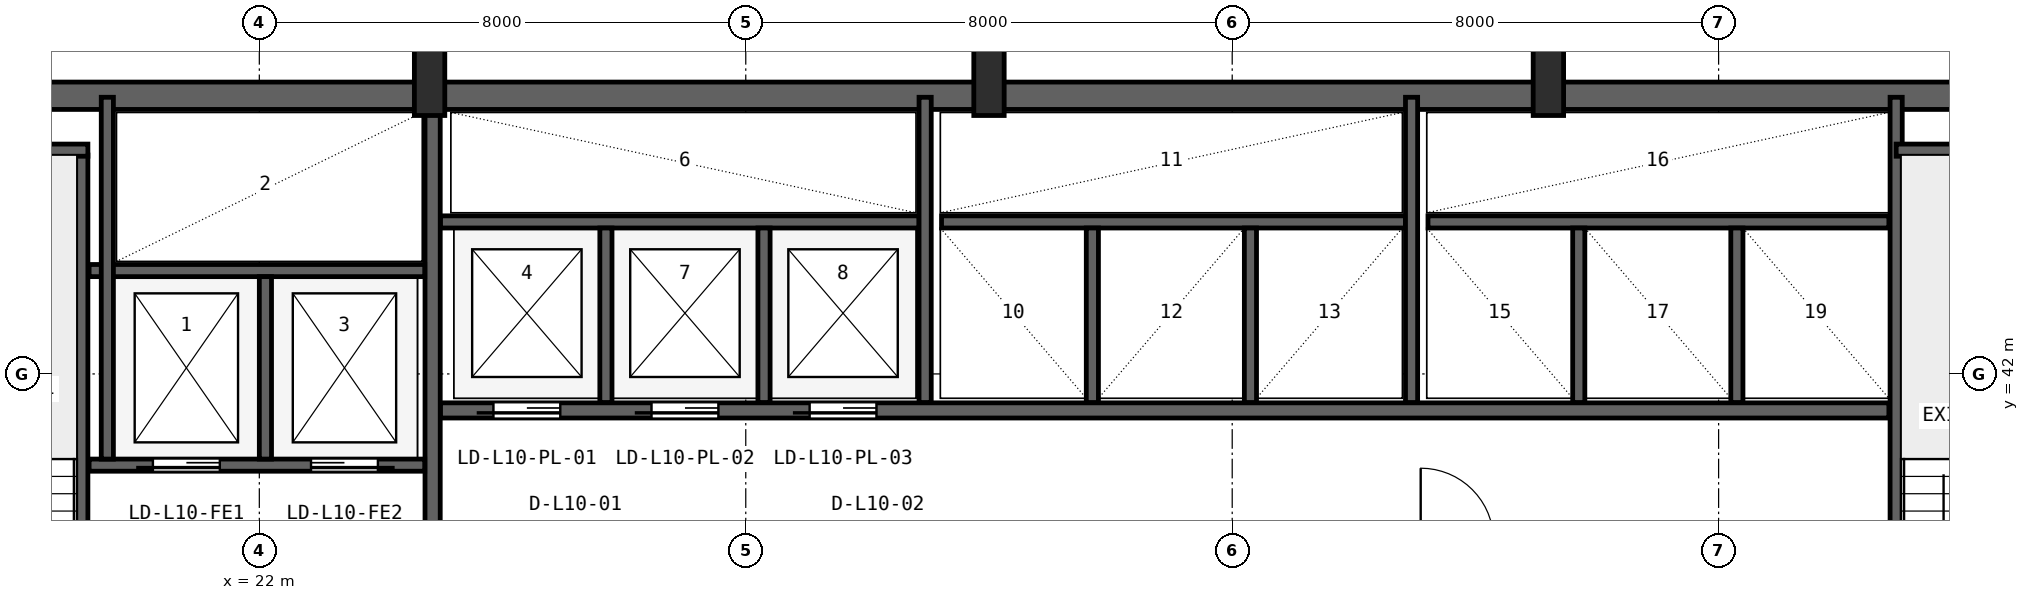
"""IFC4 building model, lengths in metres.
Left out: names, types, materials, properties, quantities, classifications, styles, units other than length and angle.
Written with IfcOpenShell. Run it as: python <this file> out.ifc"""

import sys

from ifc_helpers import new_model, si_unit, direction, frame, frame_2d, origin, origin_2d, place, context, subcontext, project, spatial, rectangle, i_section, extrude, source, transform, mapped, element, fill, save


model = new_model("IFC4")
c1 = context("Model", 3, precision=1e-05, world=origin(), true_north=direction((0.0, 1.0)))
c2 = subcontext(c1, "Body", "Model", "MODEL_VIEW")
j1 = project(units=[si_unit("LENGTHUNIT", "METRE"), si_unit("PLANEANGLEUNIT", "RADIAN")], contexts=[c1])
p1 = place(None, origin())
s1 = spatial("IfcSite", under=j1, at=p1, CompositionType="ELEMENT")
p2 = place(p1, origin())
s2 = spatial("IfcBuilding", under=s1, at=p2, CompositionType="ELEMENT")
p3 = place(p2, frame((0.0, 0.0, 47.1)))
s3 = spatial("IfcBuildingStorey", under=s2, at=p3, CompositionType="ELEMENT", Elevation=47.1)
p4 = place(p3, frame((15.6, 46.575, 0.0), z_axis=(0.0, 0.0, 1.0), x_axis=(1.0, 0.0, 0.0)))
e1 = element("IfcWall", 1, at=p4, inside=s3, PredefinedType="SHEAR", context=c2, shape_type="SweptSolid", body=[
    extrude(rectangle(XDim=36.8, YDim=0.45, at=frame_2d((18.4, 0.0))), origin(), (0.0, 0.0, 1.0), 3.65),
])
m1 = source(origin(), c2, "Body", "SweptSolid", [
    extrude(i_section(OverallWidth=0.5, OverallDepth=1.1, WebThickness=0.018, FlangeThickness=0.032, FilletRadius=0.018, at=origin_2d()), origin(), (0.0, 0.0, 1.0), 3.9),
])
for number, where, z_axis, x_axis in (
    (2, (24.8, 46.8, 0.0), (0.0, 0.0, 1.0), (1.0, 0.0, 0.0)),
    (3, (34.0, 46.8, 0.0), (0.0, 0.0, 1.0), (1.0, 0.0, 0.0)),
    (4, (43.2, 46.8, 0.0), (0.0, 0.0, 1.0), (1.0, 0.0, 0.0)),
):
    element("IfcColumn", number, at=place(p3, frame(where, z_axis=z_axis, x_axis=x_axis)), inside=s3, PredefinedType="COLUMN", context=c2, shape_type="MappedRepresentation", body=[
        mapped(m1, transform((0.0, 0.0, 0.0), x_axis=(1.0, 0.0, 0.0), y_axis=(0.0, 1.0, 0.0), z_axis=(0.0, 0.0, 1.0), scale=1.0)),
    ])
p5 = place(p3, frame((19.08, 35.95, 0.0), z_axis=(0.0, 0.0, 1.0), x_axis=(0.0, 1.0, 0.0)))
e5 = element("IfcWall", 5, at=p5, inside=s3, PredefinedType="SHEAR", context=c2, shape_type="SweptSolid", body=[
    extrude(rectangle(XDim=9.65, YDim=0.2, at=frame_2d((4.825, 0.0))), origin(), (0.0, 0.0, 1.0), 3.65),
])
p6 = place(p5, frame((0.25, 0.0, 0.0)))
e6 = element("IfcOpeningElement", 6, at=p6, cuts=e5, PredefinedType="OPENING", context=c2, shape_type="SweptSolid", body=[
    extrude(rectangle(XDim=0.95, YDim=2.1, at=frame_2d((0.475, 1.05))), frame((0.0, 0.11, 0.0), z_axis=(0.0, -1.0, 0.0), x_axis=(1.0, 0.0, 0.0)), (0.0, 0.0, 1.0), 0.22),
])
p7 = place(p3, frame((15.95, 45.68, 0.0), z_axis=(0.0, 0.0, 1.0), x_axis=(1.0, 0.0, 0.0)))
e7 = element("IfcWall", 7, at=p7, inside=s3, PredefinedType="SHEAR", context=c2, shape_type="SweptSolid", body=[
    extrude(rectangle(XDim=3.23, YDim=0.2, at=frame_2d((1.615, 0.0))), origin(), (0.0, 0.0, 1.0), 3.65),
])
p8 = place(p3, frame((24.85, 36.05, 0.0), z_axis=(0.0, 0.0, 1.0), x_axis=(0.0, 1.0, 0.0)))
e8 = element("IfcWall", 8, at=p8, inside=s3, PredefinedType="SHEAR", context=c2, shape_type="SweptSolid", body=[
    extrude(rectangle(XDim=10.45, YDim=0.25, at=frame_2d((5.225, 0.0))), origin(), (0.0, 0.0, 1.0), 3.65),
])
p9 = place(p3, frame((19.2, 40.5, 0.0), z_axis=(0.0, 0.0, 1.0), x_axis=(1.0, 0.0, 0.0)))
e9 = element("IfcWall", 9, at=p9, inside=s3, PredefinedType="SHEAR", context=c2, shape_type="SweptSolid", body=[
    extrude(rectangle(XDim=5.52, YDim=0.2, at=frame_2d((2.76, 0.0))), origin(), (0.0, 0.0, 1.0), 3.65),
])
p10 = place(p9, frame((1.05, 0.0, 0.0)))
e10 = element("IfcOpeningElement", 10, at=p10, cuts=e9, PredefinedType="OPENING", context=c2, shape_type="SweptSolid", body=[
    extrude(rectangle(XDim=1.1, YDim=2.18, at=frame_2d((0.55, 1.09))), frame((0.0, 0.11, 0.0), z_axis=(0.0, -1.0, 0.0), x_axis=(1.0, 0.0, 0.0)), (0.0, 0.0, 1.0), 0.22),
])
p11 = place(p9, frame((3.65, 0.0, 0.0)))
e11 = element("IfcOpeningElement", 11, at=p11, cuts=e9, PredefinedType="OPENING", context=c2, shape_type="SweptSolid", body=[
    extrude(rectangle(XDim=1.1, YDim=2.18, at=frame_2d((0.55, 1.09))), frame((0.0, 0.11, 0.0), z_axis=(0.0, -1.0, 0.0), x_axis=(1.0, 0.0, 0.0)), (0.0, 0.0, 1.0), 0.22),
])
p12 = place(p3, frame((19.2, 43.7, 0.0), z_axis=(0.0, 0.0, 1.0), x_axis=(1.0, 0.0, 0.0)))
e12 = element("IfcWall", 12, at=p12, inside=s3, PredefinedType="SHEAR", context=c2, shape_type="SweptSolid", body=[
    extrude(rectangle(XDim=5.52, YDim=0.2, at=frame_2d((2.76, 0.0))), origin(), (0.0, 0.0, 1.0), 3.65),
])
p13 = place(p3, frame((22.1, 40.6, 0.0), z_axis=(0.0, 0.0, 1.0), x_axis=(0.0, 1.0, 0.0)))
e13 = element("IfcWall", 13, at=p13, inside=s3, PredefinedType="SHEAR", context=c2, shape_type="SweptSolid", body=[
    extrude(rectangle(XDim=3.0, YDim=0.2, at=frame_2d((1.5, 0.0))), origin(), (0.0, 0.0, 1.0), 3.65),
])
p14 = place(p3, frame((19.5, 40.6, 0.0), z_axis=(0.0, 0.0, 1.0), x_axis=(0.0, 1.0, 0.0)))
e14 = element("IfcWall", 14, at=p14, inside=s3, PredefinedType="SHEAR", context=c2, shape_type="SweptSolid", body=[
    extrude(rectangle(XDim=5.95, YDim=0.2, at=frame_2d((2.975, 0.0))), origin(), (0.0, 0.0, 1.0), 3.65),
])
p15 = place(p3, frame((48.92, 36.05, 0.0), z_axis=(0.0, 0.0, 1.0), x_axis=(0.0, 1.0, 0.0)))
e15 = element("IfcWall", 15, at=p15, inside=s3, PredefinedType="SHEAR", context=c2, shape_type="SweptSolid", body=[
    extrude(rectangle(XDim=10.5, YDim=0.2, at=frame_2d((5.25, 0.0))), origin(), (0.0, 0.0, 1.0), 3.65),
])
p16 = place(p3, frame((48.92, 45.68, 0.0), z_axis=(0.0, 0.0, 1.0), x_axis=(1.0, 0.0, 0.0)))
e16 = element("IfcWall", 16, at=p16, inside=s3, PredefinedType="SHEAR", context=c2, shape_type="SweptSolid", body=[
    extrude(rectangle(XDim=3.18, YDim=0.2, at=frame_2d((1.59, 0.0))), origin(), (0.0, 0.0, 1.0), 3.65),
])
p17 = place(p3, frame((24.98, 41.4, 0.0), z_axis=(0.0, 0.0, 1.0), x_axis=(1.0, 0.0, 0.0)))
e17 = element("IfcWall", 17, at=p17, inside=s3, PredefinedType="SHEAR", context=c2, shape_type="SweptSolid", body=[
    extrude(rectangle(XDim=23.82, YDim=0.25, at=frame_2d((11.91, 0.0))), origin(), (0.0, 0.0, 1.0), 3.65),
])
p18 = place(p17, frame((0.87, 0.0, 0.0)))
e18 = element("IfcOpeningElement", 18, at=p18, cuts=e17, PredefinedType="OPENING", context=c2, shape_type="SweptSolid", body=[
    extrude(rectangle(XDim=1.1, YDim=2.18, at=frame_2d((0.55, 1.09))), frame((0.0, 0.135, 0.0), z_axis=(0.0, -1.0, 0.0), x_axis=(1.0, 0.0, 0.0)), (0.0, 0.0, 1.0), 0.27),
])
p19 = place(p17, frame((3.47, 0.0, 0.0)))
e19 = element("IfcOpeningElement", 19, at=p19, cuts=e17, PredefinedType="OPENING", context=c2, shape_type="SweptSolid", body=[
    extrude(rectangle(XDim=1.1, YDim=2.18, at=frame_2d((0.55, 1.09))), frame((0.0, 0.135, 0.0), z_axis=(0.0, -1.0, 0.0), x_axis=(1.0, 0.0, 0.0)), (0.0, 0.0, 1.0), 0.27),
])
p20 = place(p17, frame((6.07, 0.0, 0.0)))
e20 = element("IfcOpeningElement", 20, at=p20, cuts=e17, PredefinedType="OPENING", context=c2, shape_type="SweptSolid", body=[
    extrude(rectangle(XDim=1.1, YDim=2.18, at=frame_2d((0.55, 1.09))), frame((0.0, 0.135, 0.0), z_axis=(0.0, -1.0, 0.0), x_axis=(1.0, 0.0, 0.0)), (0.0, 0.0, 1.0), 0.27),
])
p21 = place(p3, frame((24.98, 44.5, 0.0), z_axis=(0.0, 0.0, 1.0), x_axis=(1.0, 0.0, 0.0)))
e21 = element("IfcWall", 21, at=p21, inside=s3, PredefinedType="SHEAR", context=c2, shape_type="SweptSolid", body=[
    extrude(rectangle(XDim=7.87, YDim=0.2, at=frame_2d((3.935, 0.0))), origin(), (0.0, 0.0, 1.0), 3.65),
])
for number, where, z_axis, x_axis in (
    (22, (27.7, 41.53, 0.0), (0.0, 0.0, 1.0), (0.0, 1.0, 0.0)),
    (23, (30.3, 41.53, 0.0), (0.0, 0.0, 1.0), (0.0, 1.0, 0.0)),
):
    element("IfcWall", number, at=place(p3, frame(where, z_axis=z_axis, x_axis=x_axis)), inside=s3, PredefinedType="SHEAR", context=c2, shape_type="SweptSolid", body=[
        extrude(rectangle(XDim=2.87, YDim=0.2, at=frame_2d((1.435, 0.0))), origin(), (0.0, 0.0, 1.0), 3.65),
    ])
p22 = place(p3, frame((32.95, 41.53, 0.0), z_axis=(0.0, 0.0, 1.0), x_axis=(0.0, 1.0, 0.0)))
e24 = element("IfcWall", 24, at=p22, inside=s3, PredefinedType="SHEAR", context=c2, shape_type="SweptSolid", body=[
    extrude(rectangle(XDim=5.02, YDim=0.2, at=frame_2d((2.51, 0.0))), origin(), (0.0, 0.0, 1.0), 3.65),
])
p23 = place(p3, frame((33.22, 44.5, 0.0), z_axis=(0.0, 0.0, 1.0), x_axis=(1.0, 0.0, 0.0)))
e25 = element("IfcWall", 25, at=p23, inside=s3, PredefinedType="SHEAR", context=c2, shape_type="SweptSolid", body=[
    extrude(rectangle(XDim=7.63, YDim=0.2, at=frame_2d((3.815, 0.0))), origin(), (0.0, 0.0, 1.0), 3.65),
])
for number, where, z_axis, x_axis in (
    (26, (35.7, 41.53, 0.0), (0.0, 0.0, 1.0), (0.0, 1.0, 0.0)),
    (27, (38.3, 41.53, 0.0), (0.0, 0.0, 1.0), (0.0, 1.0, 0.0)),
):
    element("IfcWall", number, at=place(p3, frame(where, z_axis=z_axis, x_axis=x_axis)), inside=s3, PredefinedType="SHEAR", context=c2, shape_type="SweptSolid", body=[
        extrude(rectangle(XDim=2.87, YDim=0.2, at=frame_2d((1.435, 0.0))), origin(), (0.0, 0.0, 1.0), 3.65),
    ])
p24 = place(p3, frame((40.95, 41.53, 0.0), z_axis=(0.0, 0.0, 1.0), x_axis=(0.0, 1.0, 0.0)))
e28 = element("IfcWall", 28, at=p24, inside=s3, PredefinedType="SHEAR", context=c2, shape_type="SweptSolid", body=[
    extrude(rectangle(XDim=5.02, YDim=0.2, at=frame_2d((2.51, 0.0))), origin(), (0.0, 0.0, 1.0), 3.65),
])
p25 = place(p3, frame((41.22, 44.5, 0.0), z_axis=(0.0, 0.0, 1.0), x_axis=(1.0, 0.0, 0.0)))
e29 = element("IfcWall", 29, at=p25, inside=s3, PredefinedType="SHEAR", context=c2, shape_type="SweptSolid", body=[
    extrude(rectangle(XDim=7.58, YDim=0.2, at=frame_2d((3.79, 0.0))), origin(), (0.0, 0.0, 1.0), 3.65),
])
for number, where, z_axis, x_axis in (
    (30, (43.7, 41.53, 0.0), (0.0, 0.0, 1.0), (0.0, 1.0, 0.0)),
    (31, (46.3, 41.53, 0.0), (0.0, 0.0, 1.0), (0.0, 1.0, 0.0)),
):
    element("IfcWall", number, at=place(p3, frame(where, z_axis=z_axis, x_axis=x_axis)), inside=s3, PredefinedType="SHEAR", context=c2, shape_type="SweptSolid", body=[
        extrude(rectangle(XDim=2.87, YDim=0.2, at=frame_2d((1.435, 0.0))), origin(), (0.0, 0.0, 1.0), 3.65),
    ])
m2 = source(origin(), c2, "Body", "SweptSolid", [
    extrude(rectangle(XDim=1.1, YDim=2.18, at=frame_2d((0.55, 1.09))), frame((0.0, 0.025, 0.0), z_axis=(0.0, -1.0, 0.0), x_axis=(1.0, 0.0, 0.0)), (0.0, 0.0, 1.0), 0.05),
])
p26 = place(p10, frame((1.1, 0.0, 0.0), z_axis=(0.0, 0.0, 1.0), x_axis=(-1.0, 0.0, 0.0)))
e32 = element("IfcDoor", 32, at=p26, inside=s3, OperationType="SLIDING_TO_LEFT", PredefinedType="DOOR", context=c2, shape_type="MappedRepresentation", body=[
    mapped(m2, transform((0.0, 0.0, 0.0), x_axis=(1.0, 0.0, 0.0), y_axis=(0.0, 1.0, 0.0), z_axis=(0.0, 0.0, 1.0), scale=1.0)),
])
fill(e10, e32)
p27 = place(p11, frame((1.1, 0.0, 0.0), z_axis=(0.0, 0.0, 1.0), x_axis=(-1.0, 0.0, 0.0)))
e33 = element("IfcDoor", 33, at=p27, inside=s3, OperationType="SLIDING_TO_RIGHT", PredefinedType="DOOR", context=c2, shape_type="MappedRepresentation", body=[
    mapped(m2, transform((0.0, 0.0, 0.0), x_axis=(1.0, 0.0, 0.0), y_axis=(0.0, 1.0, 0.0), z_axis=(0.0, 0.0, 1.0), scale=1.0)),
])
fill(e11, e33)
p28 = place(p18, frame((1.1, 0.0, 0.0), z_axis=(0.0, 0.0, 1.0), x_axis=(-1.0, 0.0, 0.0)))
e34 = element("IfcDoor", 34, at=p28, inside=s3, OperationType="SLIDING_TO_LEFT", PredefinedType="DOOR", context=c2, shape_type="MappedRepresentation", body=[
    mapped(m2, transform((0.0, 0.0, 0.0), x_axis=(1.0, 0.0, 0.0), y_axis=(0.0, 1.0, 0.0), z_axis=(0.0, 0.0, 1.0), scale=1.0)),
])
fill(e18, e34)
p29 = place(p19, frame((1.1, 0.0, 0.0), z_axis=(0.0, 0.0, 1.0), x_axis=(-1.0, 0.0, 0.0)))
e35 = element("IfcDoor", 35, at=p29, inside=s3, OperationType="SLIDING_TO_LEFT", PredefinedType="DOOR", context=c2, shape_type="MappedRepresentation", body=[
    mapped(m2, transform((0.0, 0.0, 0.0), x_axis=(1.0, 0.0, 0.0), y_axis=(0.0, 1.0, 0.0), z_axis=(0.0, 0.0, 1.0), scale=1.0)),
])
fill(e19, e35)
p30 = place(p20, frame((1.1, 0.0, 0.0), z_axis=(0.0, 0.0, 1.0), x_axis=(-1.0, 0.0, 0.0)))
e36 = element("IfcDoor", 36, at=p30, inside=s3, OperationType="SLIDING_TO_LEFT", PredefinedType="DOOR", context=c2, shape_type="MappedRepresentation", body=[
    mapped(m2, transform((0.0, 0.0, 0.0), x_axis=(1.0, 0.0, 0.0), y_axis=(0.0, 1.0, 0.0), z_axis=(0.0, 0.0, 1.0), scale=1.0)),
])
fill(e20, e36)
save(model, sys.argv[1])
